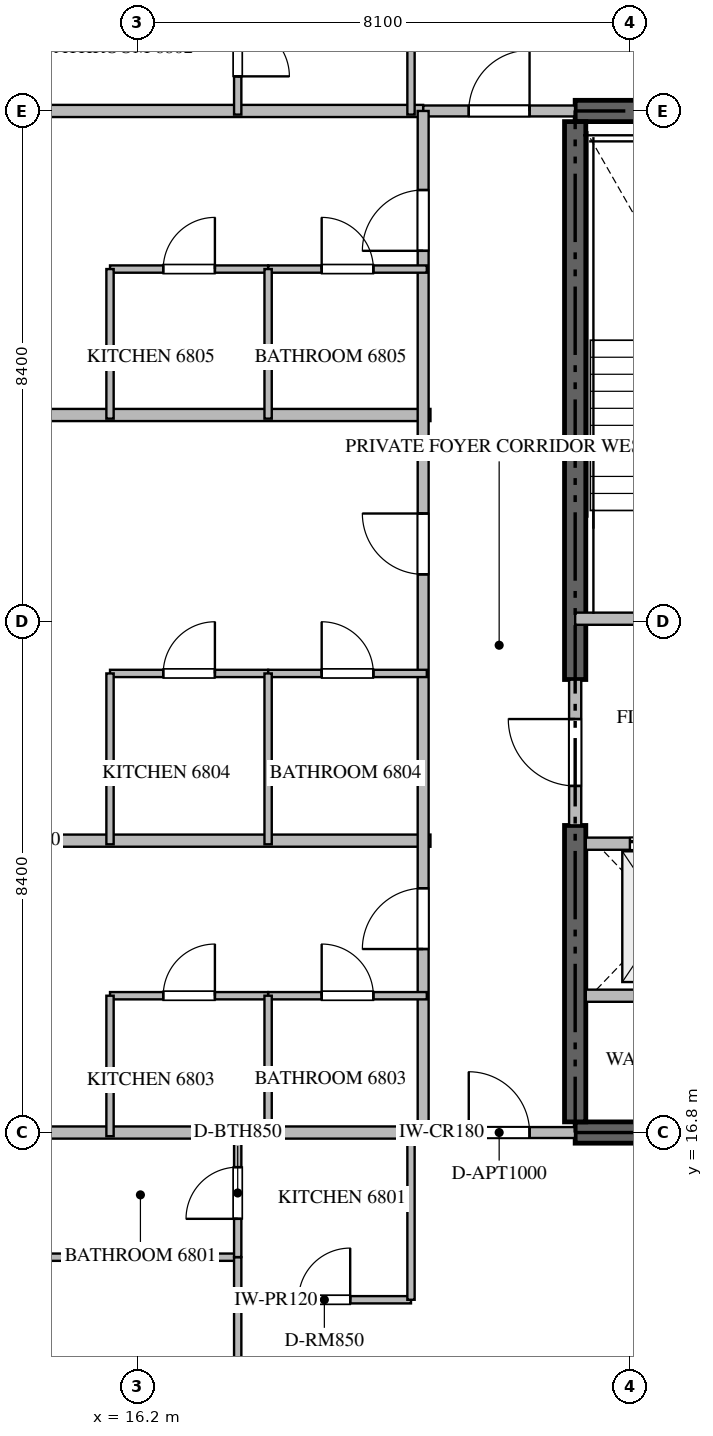
"""IFC4 building model, lengths in metres.
Left out: names, types, materials, properties, quantities, classifications, styles, units other than length and angle.
Written with IfcOpenShell. Run it as: python <this file> out.ifc"""

import sys

from ifc_helpers import new_model, si_unit, direction, frame, frame_2d, origin, place, context, subcontext, project, spatial, rectangle, extrude, source, transform, mapped, element, fill, save


model = new_model("IFC4")
c1 = context("Model", 3, precision=1e-05, world=origin(), true_north=direction((0.0, 1.0)))
c2 = subcontext(c1, "Body", "Model", "MODEL_VIEW")
j1 = project(units=[si_unit("LENGTHUNIT", "METRE"), si_unit("PLANEANGLEUNIT", "RADIAN")], contexts=[c1])
p1 = place(None, origin())
s1 = spatial("IfcSite", under=j1, at=p1, CompositionType="ELEMENT")
p2 = place(p1, origin())
s2 = spatial("IfcBuilding", under=s1, at=p2, CompositionType="ELEMENT")
p3 = place(p2, frame((0.0, 0.0, 272.05)))
s3 = spatial("IfcBuildingStorey", under=s2, at=p3, CompositionType="ELEMENT", Elevation=272.05)
for number, where, z_axis, x_axis in (
    (1, (23.4, 16.8, -0.26), (0.0, 0.0, 1.0), (1.0, 0.0, 0.0)),
    (2, (41.4, 33.6, -0.26), (0.0, 0.0, 1.0), (-1.0, 0.0, 0.0)),
):
    element("IfcWall", number, at=place(p3, frame(where, z_axis=z_axis, x_axis=x_axis)), inside=s3, PredefinedType="SHEAR", context=c2, shape_type="SweptSolid", body=[
        extrude(rectangle(XDim=18.0, YDim=0.35, at=frame_2d((9.0, 0.0))), origin(), (0.0, 0.0, 1.0), 3.848),
    ])
p4 = place(p3, frame((23.4, 16.975, -0.26), z_axis=(0.0, 0.0, 1.0), x_axis=(0.0, 1.0, 0.0)))
e3 = element("IfcWall", 3, at=p4, inside=s3, PredefinedType="SHEAR", context=c2, shape_type="SweptSolid", body=[
    extrude(rectangle(XDim=4.875, YDim=0.35, at=frame_2d((2.438, 0.0))), origin(), (0.0, 0.0, 1.0), 3.848),
])
p5 = place(p3, frame((23.4, 24.25, -0.26), z_axis=(0.0, 0.0, 1.0), x_axis=(0.0, 1.0, 0.0)))
e4 = element("IfcWall", 4, at=p5, inside=s3, PredefinedType="SHEAR", context=c2, shape_type="SweptSolid", body=[
    extrude(rectangle(XDim=9.175, YDim=0.35, at=frame_2d((4.587, 0.0))), origin(), (0.0, 0.0, 1.0), 3.848),
])
p6 = place(p3, frame((23.4, 25.25, 0.0), z_axis=(0.0, 0.0, 1.0), x_axis=(1.0, 0.0, 0.0)))
e5 = element("IfcWall", 5, at=p6, inside=s3, PredefinedType="STANDARD", context=c2, shape_type="SweptSolid", body=[
    extrude(rectangle(XDim=4.45, YDim=0.2, at=frame_2d((2.225, 0.0))), origin(), (0.0, 0.0, 1.0), 3.59),
])
p7 = place(p6, frame((1.65, 0.0, 0.0)))
e6 = element("IfcOpeningElement", 6, at=p7, cuts=e5, PredefinedType="OPENING", context=c2, shape_type="SweptSolid", body=[
    extrude(rectangle(XDim=1.1, YDim=2.15, at=frame_2d((0.55, 1.075))), frame((0.0, 0.11, 0.0), z_axis=(0.0, -1.0, 0.0), x_axis=(1.0, 0.0, 0.0)), (0.0, 0.0, 1.0), 0.22),
])
p8 = place(p3, frame((23.575, 21.55, 0.0), z_axis=(0.0, 0.0, 1.0), x_axis=(1.0, 0.0, 0.0)))
e7 = element("IfcWall", 7, at=p8, inside=s3, PredefinedType="STANDARD", context=c2, shape_type="SweptSolid", body=[
    extrude(rectangle(XDim=2.475, YDim=0.2, at=frame_2d((1.238, 0.0))), origin(), (0.0, 0.0, 1.0), 3.59),
])
p9 = place(p8, frame((0.725, 0.0, 0.0)))
e8 = element("IfcOpeningElement", 8, at=p9, cuts=e7, PredefinedType="OPENING", context=c2, shape_type="SweptSolid", body=[
    extrude(rectangle(XDim=1.2, YDim=2.2, at=frame_2d((0.6, 1.1))), frame((0.0, 0.11, 0.0), z_axis=(0.0, -1.0, 0.0), x_axis=(1.0, 0.0, 0.0)), (0.0, 0.0, 1.0), 0.22),
])
p10 = place(p3, frame((23.575, 19.05, 0.0), z_axis=(0.0, 0.0, 1.0), x_axis=(1.0, 0.0, 0.0)))
e9 = element("IfcWall", 9, at=p10, inside=s3, PredefinedType="STANDARD", context=c2, shape_type="SweptSolid", body=[
    extrude(rectangle(XDim=2.475, YDim=0.2, at=frame_2d((1.238, 0.0))), origin(), (0.0, 0.0, 1.0), 3.59),
])
p11 = place(p3, frame((23.4, 21.852, 0.0), z_axis=(0.0, 0.0, 1.0), x_axis=(0.0, 1.0, 0.0)))
e10 = element("IfcWall", 10, at=p11, inside=s3, PredefinedType="STANDARD", context=c2, shape_type="SweptSolid", body=[
    extrude(rectangle(XDim=2.396, YDim=0.2, at=frame_2d((1.198, 0.0))), origin(), (0.0, 0.0, 1.0), 3.59),
])
p12 = place(p11, frame((0.648, 0.0, 0.0)))
e11 = element("IfcOpeningElement", 11, at=p12, cuts=e10, PredefinedType="OPENING", context=c2, shape_type="SweptSolid", body=[
    extrude(rectangle(XDim=1.1, YDim=2.15, at=frame_2d((0.55, 1.075))), frame((0.0, 0.11, 0.0), z_axis=(0.0, -1.0, 0.0), x_axis=(1.0, 0.0, 0.0)), (0.0, 0.0, 1.0), 0.22),
])
for number, where, z_axis, x_axis in (
    (12, (7.482, 21.6, 0.0), (0.0, 0.0, 1.0), (1.0, 0.0, 0.0)),
    (13, (7.482, 28.6, 0.0), (0.0, 0.0, 1.0), (1.0, 0.0, 0.0)),
):
    element("IfcWall", number, at=place(p3, frame(where, z_axis=z_axis, x_axis=x_axis)), inside=s3, PredefinedType="PARTITIONING", context=c2, shape_type="SweptSolid", body=[
        extrude(rectangle(XDim=13.538, YDim=0.2, at=frame_2d((6.769, 0.0))), origin(), (0.0, 0.0, 1.0), 3.59),
    ])
for number, where, z_axis, x_axis in (
    (14, (7.482, 16.8, 0.0), (0.0, 0.0, 1.0), (1.0, 0.0, 0.0)),
    (15, (7.482, 33.6, 0.0), (0.0, 0.0, 1.0), (1.0, 0.0, 0.0)),
):
    element("IfcWall", number, at=place(p3, frame(where, z_axis=z_axis, x_axis=x_axis)), inside=s3, PredefinedType="PARTITIONING", context=c2, shape_type="SweptSolid", body=[
        extrude(rectangle(XDim=13.418, YDim=0.2, at=frame_2d((6.709, 0.0))), origin(), (0.0, 0.0, 1.0), 3.59),
    ])
p13 = place(p3, frame((20.902, 16.8, 0.0), z_axis=(0.0, 0.0, 1.0), x_axis=(1.0, 0.0, 0.0)))
e16 = element("IfcWall", 16, at=p13, inside=s3, PredefinedType="PARTITIONING", context=c2, shape_type="SweptSolid", body=[
    extrude(rectangle(XDim=2.496, YDim=0.18, at=frame_2d((1.248, 0.0))), origin(), (0.0, 0.0, 1.0), 3.59),
])
p14 = place(p13, frame((0.748, 0.0, 0.0)))
e17 = element("IfcOpeningElement", 17, at=p14, cuts=e16, PredefinedType="OPENING", context=c2, shape_type="SweptSolid", body=[
    extrude(rectangle(XDim=1.0, YDim=2.15, at=frame_2d((0.5, 1.075))), frame((0.0, 0.1, 0.0), z_axis=(0.0, -1.0, 0.0), x_axis=(1.0, 0.0, 0.0)), (0.0, 0.0, 1.0), 0.2),
])
p15 = place(p3, frame((20.902, 33.6, 0.0), z_axis=(0.0, 0.0, 1.0), x_axis=(1.0, 0.0, 0.0)))
e18 = element("IfcWall", 18, at=p15, inside=s3, PredefinedType="PARTITIONING", context=c2, shape_type="SweptSolid", body=[
    extrude(rectangle(XDim=2.496, YDim=0.18, at=frame_2d((1.248, 0.0))), origin(), (0.0, 0.0, 1.0), 3.59),
])
p16 = place(p15, frame((0.748, 0.0, 0.0)))
e19 = element("IfcOpeningElement", 19, at=p16, cuts=e18, PredefinedType="OPENING", context=c2, shape_type="SweptSolid", body=[
    extrude(rectangle(XDim=1.0, YDim=2.15, at=frame_2d((0.5, 1.075))), frame((0.0, 0.1, 0.0), z_axis=(0.0, -1.0, 0.0), x_axis=(1.0, 0.0, 0.0)), (0.0, 0.0, 1.0), 0.2),
])
p17 = place(p3, frame((20.9, 16.8, 0.0), z_axis=(0.0, 0.0, 1.0), x_axis=(0.0, 1.0, 0.0)))
e20 = element("IfcWall", 20, at=p17, inside=s3, PredefinedType="PARTITIONING", context=c2, shape_type="SweptSolid", body=[
    extrude(rectangle(XDim=16.8, YDim=0.18, at=frame_2d((8.4, 0.0))), origin(), (0.0, 0.0, 1.0), 3.59),
])
p18 = place(p17, frame((3.018, 0.0, 0.0)))
e21 = element("IfcOpeningElement", 21, at=p18, cuts=e20, PredefinedType="OPENING", context=c2, shape_type="SweptSolid", body=[
    extrude(rectangle(XDim=1.0, YDim=2.15, at=frame_2d((0.5, 1.075))), frame((0.0, 0.1, 0.0), z_axis=(0.0, -1.0, 0.0), x_axis=(1.0, 0.0, 0.0)), (0.0, 0.0, 1.0), 0.2),
])
p19 = place(p17, frame((9.18, 0.0, 0.0)))
e22 = element("IfcOpeningElement", 22, at=p19, cuts=e20, PredefinedType="OPENING", context=c2, shape_type="SweptSolid", body=[
    extrude(rectangle(XDim=1.0, YDim=2.15, at=frame_2d((0.5, 1.075))), frame((0.0, 0.1, 0.0), z_axis=(0.0, -1.0, 0.0), x_axis=(1.0, 0.0, 0.0)), (0.0, 0.0, 1.0), 0.2),
])
p20 = place(p17, frame((14.5, 0.0, 0.0)))
e23 = element("IfcOpeningElement", 23, at=p20, cuts=e20, PredefinedType="OPENING", context=c2, shape_type="SweptSolid", body=[
    extrude(rectangle(XDim=1.0, YDim=2.15, at=frame_2d((0.5, 1.075))), frame((0.0, 0.1, 0.0), z_axis=(0.0, -1.0, 0.0), x_axis=(1.0, 0.0, 0.0)), (0.0, 0.0, 1.0), 0.2),
])
p21 = place(p3, frame((17.85, 14.05, 0.0), z_axis=(0.0, 0.0, 1.0), x_axis=(1.0, 0.0, 0.0)))
e24 = element("IfcWall", 24, at=p21, inside=s3, PredefinedType="PARTITIONING", context=c2, shape_type="SweptSolid", body=[
    extrude(rectangle(XDim=2.85, YDim=0.12, at=frame_2d((1.425, 0.0))), origin(), (0.0, 0.0, 1.0), 3.59),
])
p22 = place(p21, frame((1.0, 0.0, 0.0)))
e25 = element("IfcOpeningElement", 25, at=p22, cuts=e24, PredefinedType="OPENING", context=c2, shape_type="SweptSolid", body=[
    extrude(rectangle(XDim=0.85, YDim=2.1, at=frame_2d((0.425, 1.05))), frame((0.0, 0.07, 0.0), z_axis=(0.0, -1.0, 0.0), x_axis=(1.0, 0.0, 0.0)), (0.0, 0.0, 1.0), 0.14),
])
p23 = place(p3, frame((20.7, 14.05, 0.0), z_axis=(0.0, 0.0, 1.0), x_axis=(0.0, 1.0, 0.0)))
e26 = element("IfcWall", 26, at=p23, inside=s3, PredefinedType="PARTITIONING", context=c2, shape_type="SweptSolid", body=[
    extrude(rectangle(XDim=2.81, YDim=0.12, at=frame_2d((1.405, 0.0))), origin(), (0.0, 0.0, 1.0), 3.59),
])
p24 = place(p3, frame((14.65, 14.75, 0.0), z_axis=(0.0, 0.0, 1.0), x_axis=(1.0, 0.0, 0.0)))
e27 = element("IfcWall", 27, at=p24, inside=s3, PredefinedType="PARTITIONING", context=c2, shape_type="SweptSolid", body=[
    extrude(rectangle(XDim=3.2, YDim=0.12, at=frame_2d((1.6, 0.0))), origin(), (0.0, 0.0, 1.0), 3.59),
])
p25 = place(p3, frame((17.85, 10.096, 0.0), z_axis=(0.0, 0.0, 1.0), x_axis=(0.0, 1.0, 0.0)))
e28 = element("IfcWall", 28, at=p25, inside=s3, PredefinedType="PARTITIONING", context=c2, shape_type="SweptSolid", body=[
    extrude(rectangle(XDim=4.654, YDim=0.12, at=frame_2d((2.327, 0.0))), origin(), (0.0, 0.0, 1.0), 3.59),
])
p26 = place(p25, frame((1.902, 0.0, 0.0)))
e29 = element("IfcOpeningElement", 29, at=p26, cuts=e28, PredefinedType="OPENING", context=c2, shape_type="SweptSolid", body=[
    extrude(rectangle(XDim=0.85, YDim=2.1, at=frame_2d((0.425, 1.05))), frame((0.0, 0.07, 0.0), z_axis=(0.0, -1.0, 0.0), x_axis=(1.0, 0.0, 0.0)), (0.0, 0.0, 1.0), 0.14),
])
p27 = place(p3, frame((17.85, 14.752, 0.0), z_axis=(0.0, 0.0, 1.0), x_axis=(0.0, 1.0, 0.0)))
e30 = element("IfcWall", 30, at=p27, inside=s3, PredefinedType="PARTITIONING", context=c2, shape_type="SweptSolid", body=[
    extrude(rectangle(XDim=2.108, YDim=0.12, at=frame_2d((1.054, 0.0))), origin(), (0.0, 0.0, 1.0), 3.59),
])
p28 = place(p27, frame((0.629, 0.0, 0.0)))
e31 = element("IfcOpeningElement", 31, at=p28, cuts=e30, PredefinedType="OPENING", context=c2, shape_type="SweptSolid", body=[
    extrude(rectangle(XDim=0.85, YDim=2.1, at=frame_2d((0.425, 1.05))), frame((0.0, 0.07, 0.0), z_axis=(0.0, -1.0, 0.0), x_axis=(1.0, 0.0, 0.0)), (0.0, 0.0, 1.0), 0.14),
])
p29 = place(p3, frame((20.7, 36.35, 0.0), z_axis=(0.0, 0.0, 1.0), x_axis=(0.0, -1.0, 0.0)))
e32 = element("IfcWall", 32, at=p29, inside=s3, PredefinedType="PARTITIONING", context=c2, shape_type="SweptSolid", body=[
    extrude(rectangle(XDim=2.81, YDim=0.12, at=frame_2d((1.405, 0.0))), origin(), (0.0, 0.0, 1.0), 3.59),
])
p30 = place(p3, frame((17.85, 35.648, 0.0), z_axis=(0.0, 0.0, 1.0), x_axis=(0.0, -1.0, 0.0)))
e33 = element("IfcWall", 33, at=p30, inside=s3, PredefinedType="PARTITIONING", context=c2, shape_type="SweptSolid", body=[
    extrude(rectangle(XDim=2.108, YDim=0.12, at=frame_2d((1.054, 0.0))), origin(), (0.0, 0.0, 1.0), 3.59),
])
p31 = place(p30, frame((0.629, 0.0, 0.0)))
e34 = element("IfcOpeningElement", 34, at=p31, cuts=e33, PredefinedType="OPENING", context=c2, shape_type="SweptSolid", body=[
    extrude(rectangle(XDim=0.85, YDim=2.1, at=frame_2d((0.425, 1.05))), frame((0.0, 0.07, 0.0), z_axis=(0.0, -1.0, 0.0), x_axis=(1.0, 0.0, 0.0)), (0.0, 0.0, 1.0), 0.14),
])
p32 = place(p3, frame((15.75, 19.05, 0.0), z_axis=(0.0, 0.0, 1.0), x_axis=(1.0, 0.0, 0.0)))
e35 = element("IfcWall", 35, at=p32, inside=s3, PredefinedType="PARTITIONING", context=c2, shape_type="SweptSolid", body=[
    extrude(rectangle(XDim=2.6, YDim=0.12, at=frame_2d((1.3, 0.0))), origin(), (0.0, 0.0, 1.0), 3.59),
])
p33 = place(p32, frame((0.875, 0.0, 0.0)))
e36 = element("IfcOpeningElement", 36, at=p33, cuts=e35, PredefinedType="OPENING", context=c2, shape_type="SweptSolid", body=[
    extrude(rectangle(XDim=0.85, YDim=2.1, at=frame_2d((0.425, 1.05))), frame((0.0, 0.07, 0.0), z_axis=(0.0, -1.0, 0.0), x_axis=(1.0, 0.0, 0.0)), (0.0, 0.0, 1.0), 0.14),
])
p34 = place(p3, frame((18.352, 19.05, 0.0), z_axis=(0.0, 0.0, 1.0), x_axis=(1.0, 0.0, 0.0)))
e37 = element("IfcWall", 37, at=p34, inside=s3, PredefinedType="PARTITIONING", context=c2, shape_type="SweptSolid", body=[
    extrude(rectangle(XDim=2.608, YDim=0.12, at=frame_2d((1.304, 0.0))), origin(), (0.0, 0.0, 1.0), 3.59),
])
p35 = place(p34, frame((0.879, 0.0, 0.0)))
e38 = element("IfcOpeningElement", 38, at=p35, cuts=e37, PredefinedType="OPENING", context=c2, shape_type="SweptSolid", body=[
    extrude(rectangle(XDim=0.85, YDim=2.1, at=frame_2d((0.425, 1.05))), frame((0.0, 0.07, 0.0), z_axis=(0.0, -1.0, 0.0), x_axis=(1.0, 0.0, 0.0)), (0.0, 0.0, 1.0), 0.14),
])
for number, where, z_axis, x_axis in (
    (39, (18.35, 16.74, 0.0), (0.0, 0.0, 1.0), (0.0, 1.0, 0.0)),
    (40, (15.75, 16.74, 0.0), (0.0, 0.0, 1.0), (0.0, 1.0, 0.0)),
):
    element("IfcWall", number, at=place(p3, frame(where, z_axis=z_axis, x_axis=x_axis)), inside=s3, PredefinedType="PARTITIONING", context=c2, shape_type="SweptSolid", body=[
        extrude(rectangle(XDim=2.31, YDim=0.12, at=frame_2d((1.155, 0.0))), origin(), (0.0, 0.0, 1.0), 3.59),
    ])
p36 = place(p3, frame((15.75, 24.35, 0.0), z_axis=(0.0, 0.0, 1.0), x_axis=(1.0, 0.0, 0.0)))
e41 = element("IfcWall", 41, at=p36, inside=s3, PredefinedType="PARTITIONING", context=c2, shape_type="SweptSolid", body=[
    extrude(rectangle(XDim=2.6, YDim=0.12, at=frame_2d((1.3, 0.0))), origin(), (0.0, 0.0, 1.0), 3.59),
])
p37 = place(p36, frame((0.875, 0.0, 0.0)))
e42 = element("IfcOpeningElement", 42, at=p37, cuts=e41, PredefinedType="OPENING", context=c2, shape_type="SweptSolid", body=[
    extrude(rectangle(XDim=0.85, YDim=2.1, at=frame_2d((0.425, 1.05))), frame((0.0, 0.07, 0.0), z_axis=(0.0, -1.0, 0.0), x_axis=(1.0, 0.0, 0.0)), (0.0, 0.0, 1.0), 0.14),
])
p38 = place(p3, frame((18.352, 24.35, 0.0), z_axis=(0.0, 0.0, 1.0), x_axis=(1.0, 0.0, 0.0)))
e43 = element("IfcWall", 43, at=p38, inside=s3, PredefinedType="PARTITIONING", context=c2, shape_type="SweptSolid", body=[
    extrude(rectangle(XDim=2.608, YDim=0.12, at=frame_2d((1.304, 0.0))), origin(), (0.0, 0.0, 1.0), 3.59),
])
p39 = place(p38, frame((0.879, 0.0, 0.0)))
e44 = element("IfcOpeningElement", 44, at=p39, cuts=e43, PredefinedType="OPENING", context=c2, shape_type="SweptSolid", body=[
    extrude(rectangle(XDim=0.85, YDim=2.1, at=frame_2d((0.425, 1.05))), frame((0.0, 0.07, 0.0), z_axis=(0.0, -1.0, 0.0), x_axis=(1.0, 0.0, 0.0)), (0.0, 0.0, 1.0), 0.14),
])
for number, where, z_axis, x_axis in (
    (45, (18.35, 21.54, 0.0), (0.0, 0.0, 1.0), (0.0, 1.0, 0.0)),
    (46, (15.75, 21.54, 0.0), (0.0, 0.0, 1.0), (0.0, 1.0, 0.0)),
):
    element("IfcWall", number, at=place(p3, frame(where, z_axis=z_axis, x_axis=x_axis)), inside=s3, PredefinedType="PARTITIONING", context=c2, shape_type="SweptSolid", body=[
        extrude(rectangle(XDim=2.81, YDim=0.12, at=frame_2d((1.405, 0.0))), origin(), (0.0, 0.0, 1.0), 3.59),
    ])
p40 = place(p3, frame((15.75, 31.0, 0.0), z_axis=(0.0, 0.0, 1.0), x_axis=(1.0, 0.0, 0.0)))
e47 = element("IfcWall", 47, at=p40, inside=s3, PredefinedType="PARTITIONING", context=c2, shape_type="SweptSolid", body=[
    extrude(rectangle(XDim=2.6, YDim=0.12, at=frame_2d((1.3, 0.0))), origin(), (0.0, 0.0, 1.0), 3.59),
])
p41 = place(p40, frame((0.875, 0.0, 0.0)))
e48 = element("IfcOpeningElement", 48, at=p41, cuts=e47, PredefinedType="OPENING", context=c2, shape_type="SweptSolid", body=[
    extrude(rectangle(XDim=0.85, YDim=2.1, at=frame_2d((0.425, 1.05))), frame((0.0, 0.07, 0.0), z_axis=(0.0, -1.0, 0.0), x_axis=(1.0, 0.0, 0.0)), (0.0, 0.0, 1.0), 0.14),
])
p42 = place(p3, frame((18.352, 31.0, 0.0), z_axis=(0.0, 0.0, 1.0), x_axis=(1.0, 0.0, 0.0)))
e49 = element("IfcWall", 49, at=p42, inside=s3, PredefinedType="PARTITIONING", context=c2, shape_type="SweptSolid", body=[
    extrude(rectangle(XDim=2.608, YDim=0.12, at=frame_2d((1.304, 0.0))), origin(), (0.0, 0.0, 1.0), 3.59),
])
p43 = place(p42, frame((0.879, 0.0, 0.0)))
e50 = element("IfcOpeningElement", 50, at=p43, cuts=e49, PredefinedType="OPENING", context=c2, shape_type="SweptSolid", body=[
    extrude(rectangle(XDim=0.85, YDim=2.1, at=frame_2d((0.425, 1.05))), frame((0.0, 0.07, 0.0), z_axis=(0.0, -1.0, 0.0), x_axis=(1.0, 0.0, 0.0)), (0.0, 0.0, 1.0), 0.14),
])
for number, where, z_axis, x_axis in (
    (51, (18.35, 28.54, 0.0), (0.0, 0.0, 1.0), (0.0, 1.0, 0.0)),
    (52, (15.75, 28.54, 0.0), (0.0, 0.0, 1.0), (0.0, 1.0, 0.0)),
):
    element("IfcWall", number, at=place(p3, frame(where, z_axis=z_axis, x_axis=x_axis)), inside=s3, PredefinedType="PARTITIONING", context=c2, shape_type="SweptSolid", body=[
        extrude(rectangle(XDim=2.46, YDim=0.12, at=frame_2d((1.23, 0.0))), origin(), (0.0, 0.0, 1.0), 3.59),
    ])
m1 = source(origin(), c2, "Body", "SweptSolid", [
    extrude(rectangle(XDim=1.2, YDim=2.2, at=frame_2d((0.6, 1.1))), frame((0.0, 0.025, 0.0), z_axis=(0.0, -1.0, 0.0), x_axis=(1.0, 0.0, 0.0)), (0.0, 0.0, 1.0), 0.05),
])
p44 = place(p9, origin())
e53 = element("IfcDoor", 53, at=p44, inside=s3, OperationType="DOUBLE_DOOR_SLIDING", PredefinedType="DOOR", context=c2, shape_type="MappedRepresentation", body=[
    mapped(m1, transform((0.0, 0.0, 0.0), scale=1.0)),
])
fill(e8, e53)
m2 = source(origin(), c2, "Body", "SweptSolid", [
    extrude(rectangle(XDim=1.1, YDim=2.15, at=frame_2d((0.55, 1.075))), frame((0.0, 0.025, 0.0), z_axis=(0.0, -1.0, 0.0), x_axis=(1.0, 0.0, 0.0)), (0.0, 0.0, 1.0), 0.05),
])
p45 = place(p12, origin())
e54 = element("IfcDoor", 54, at=p45, inside=s3, OperationType="SINGLE_SWING_RIGHT", PredefinedType="DOOR", context=c2, shape_type="MappedRepresentation", body=[
    mapped(m2, transform((0.0, 0.0, 0.0), scale=1.0)),
])
fill(e11, e54)
m3 = source(origin(), c2, "Body", "SweptSolid", [
    extrude(rectangle(XDim=1.0, YDim=2.15, at=frame_2d((0.5, 1.075))), frame((0.0, 0.025, 0.0), z_axis=(0.0, -1.0, 0.0), x_axis=(1.0, 0.0, 0.0)), (0.0, 0.0, 1.0), 0.05),
])
p46 = place(p14, origin())
e55 = element("IfcDoor", 55, at=p46, inside=s3, OperationType="SINGLE_SWING_LEFT", PredefinedType="DOOR", context=c2, shape_type="MappedRepresentation", body=[
    mapped(m3, transform((0.0, 0.0, 0.0), scale=1.0)),
])
fill(e17, e55)
p47 = place(p16, origin())
e56 = element("IfcDoor", 56, at=p47, inside=s3, OperationType="SINGLE_SWING_RIGHT", PredefinedType="DOOR", context=c2, shape_type="MappedRepresentation", body=[
    mapped(m3, transform((0.0, 0.0, 0.0), scale=1.0)),
])
fill(e19, e56)
p48 = place(p18, origin())
e57 = element("IfcDoor", 57, at=p48, inside=s3, OperationType="SINGLE_SWING_LEFT", PredefinedType="DOOR", context=c2, shape_type="MappedRepresentation", body=[
    mapped(m3, transform((0.0, 0.0, 0.0), scale=1.0)),
])
fill(e21, e57)
p49 = place(p19, origin())
e58 = element("IfcDoor", 58, at=p49, inside=s3, OperationType="SINGLE_SWING_RIGHT", PredefinedType="DOOR", context=c2, shape_type="MappedRepresentation", body=[
    mapped(m3, transform((0.0, 0.0, 0.0), scale=1.0)),
])
fill(e22, e58)
p50 = place(p20, origin())
e59 = element("IfcDoor", 59, at=p50, inside=s3, OperationType="SINGLE_SWING_LEFT", PredefinedType="DOOR", context=c2, shape_type="MappedRepresentation", body=[
    mapped(m3, transform((0.0, 0.0, 0.0), scale=1.0)),
])
fill(e23, e59)
m4 = source(origin(), c2, "Body", "SweptSolid", [
    extrude(rectangle(XDim=0.85, YDim=2.1, at=frame_2d((0.425, 1.05))), frame((0.0, 0.025, 0.0), z_axis=(0.0, -1.0, 0.0), x_axis=(1.0, 0.0, 0.0)), (0.0, 0.0, 1.0), 0.05),
])
p51 = place(p22, origin())
e60 = element("IfcDoor", 60, at=p51, inside=s3, OperationType="SINGLE_SWING_RIGHT", PredefinedType="DOOR", context=c2, shape_type="MappedRepresentation", body=[
    mapped(m4, transform((0.0, 0.0, 0.0), scale=1.0)),
])
fill(e25, e60)
p52 = place(p28, origin())
e61 = element("IfcDoor", 61, at=p52, inside=s3, OperationType="SINGLE_SWING_LEFT", PredefinedType="DOOR", context=c2, shape_type="MappedRepresentation", body=[
    mapped(m4, transform((0.0, 0.0, 0.0), scale=1.0)),
])
fill(e31, e61)
p53 = place(p31, origin())
e62 = element("IfcDoor", 62, at=p53, inside=s3, OperationType="SINGLE_SWING_RIGHT", PredefinedType="DOOR", context=c2, shape_type="MappedRepresentation", body=[
    mapped(m4, transform((0.0, 0.0, 0.0), scale=1.0)),
])
fill(e34, e62)
p54 = place(p33, origin())
e63 = element("IfcDoor", 63, at=p54, inside=s3, OperationType="SINGLE_SWING_RIGHT", PredefinedType="DOOR", context=c2, shape_type="MappedRepresentation", body=[
    mapped(m4, transform((0.0, 0.0, 0.0), scale=1.0)),
])
fill(e36, e63)
p55 = place(p35, origin())
e64 = element("IfcDoor", 64, at=p55, inside=s3, OperationType="SINGLE_SWING_LEFT", PredefinedType="DOOR", context=c2, shape_type="MappedRepresentation", body=[
    mapped(m4, transform((0.0, 0.0, 0.0), scale=1.0)),
])
fill(e38, e64)
p56 = place(p37, origin())
e65 = element("IfcDoor", 65, at=p56, inside=s3, OperationType="SINGLE_SWING_RIGHT", PredefinedType="DOOR", context=c2, shape_type="MappedRepresentation", body=[
    mapped(m4, transform((0.0, 0.0, 0.0), scale=1.0)),
])
fill(e42, e65)
p57 = place(p39, origin())
e66 = element("IfcDoor", 66, at=p57, inside=s3, OperationType="SINGLE_SWING_LEFT", PredefinedType="DOOR", context=c2, shape_type="MappedRepresentation", body=[
    mapped(m4, transform((0.0, 0.0, 0.0), scale=1.0)),
])
fill(e44, e66)
p58 = place(p41, origin())
e67 = element("IfcDoor", 67, at=p58, inside=s3, OperationType="SINGLE_SWING_RIGHT", PredefinedType="DOOR", context=c2, shape_type="MappedRepresentation", body=[
    mapped(m4, transform((0.0, 0.0, 0.0), scale=1.0)),
])
fill(e48, e67)
p59 = place(p43, origin())
e68 = element("IfcDoor", 68, at=p59, inside=s3, OperationType="SINGLE_SWING_LEFT", PredefinedType="DOOR", context=c2, shape_type="MappedRepresentation", body=[
    mapped(m4, transform((0.0, 0.0, 0.0), scale=1.0)),
])
fill(e50, e68)
save(model, sys.argv[1])
